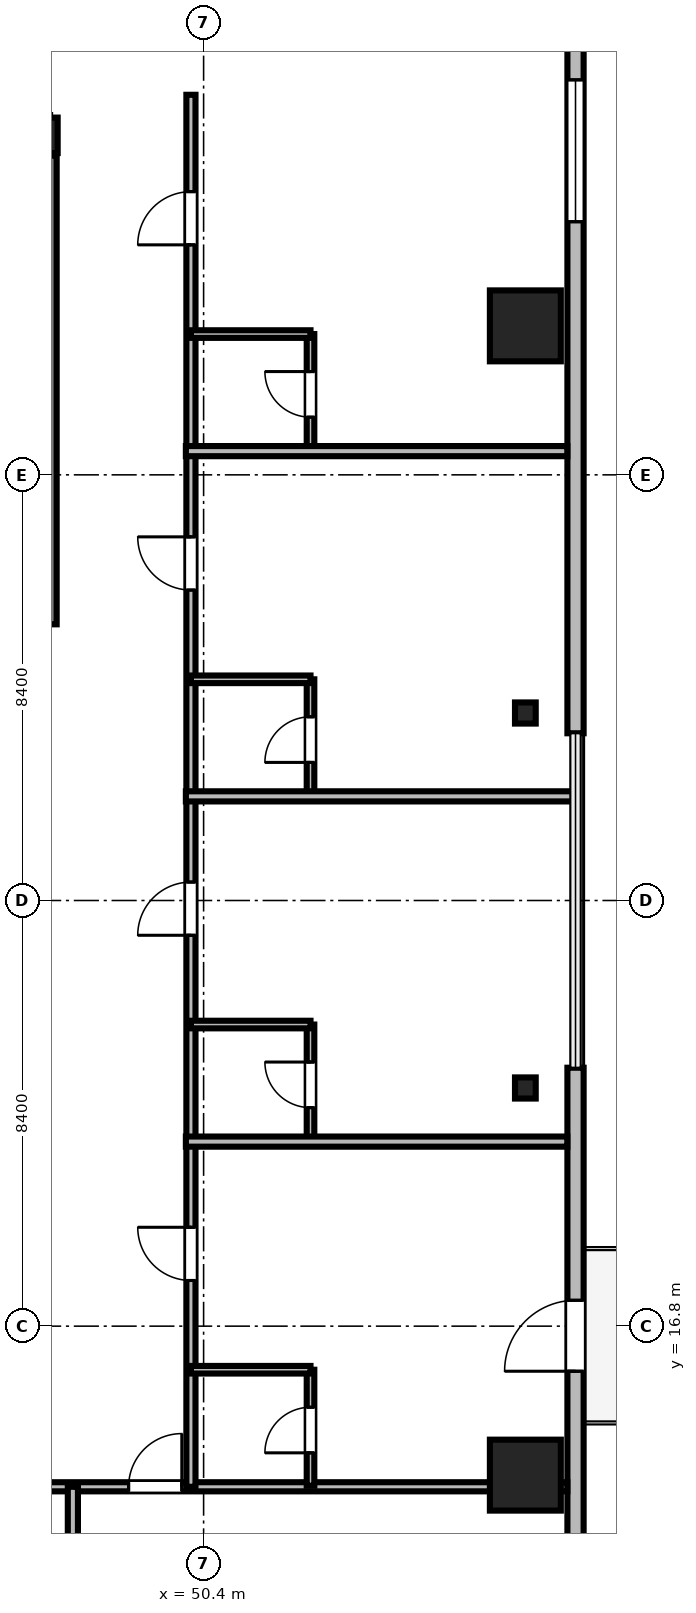
"""IFC4 building model, lengths in metres.
Left out: names, types, materials, properties, quantities, classifications, styles, units other than length and angle.
Written with IfcOpenShell. Run it as: python <this file> out.ifc"""

import sys

from ifc_helpers import new_model, si_unit, direction, frame, frame_2d, origin, origin_2d, place, context, subcontext, project, spatial, rectangle, i_section, extrude, source, transform, mapped, element, fill, save


model = new_model("IFC4")
c1 = context("Model", 3, precision=1e-05, world=origin(), true_north=direction((0.0, 1.0)))
c2 = subcontext(c1, "Body", "Model", "MODEL_VIEW")
j1 = project(units=[si_unit("LENGTHUNIT", "METRE"), si_unit("PLANEANGLEUNIT", "RADIAN")], contexts=[c1])
p1 = place(None, origin())
s1 = spatial("IfcSite", under=j1, at=p1, CompositionType="ELEMENT")
p2 = place(p1, origin())
s2 = spatial("IfcBuilding", under=s1, at=p2, CompositionType="ELEMENT")
p3 = place(p2, frame((0.0, 0.0, 196.05)))
s3 = spatial("IfcBuildingStorey", under=s2, at=p3, CompositionType="ELEMENT", Elevation=196.05)
m1 = source(origin(), c2, "Body", "SweptSolid", [
    extrude(i_section(OverallWidth=0.3, OverallDepth=0.7, WebThickness=0.017, FlangeThickness=0.032, FilletRadius=0.027, at=origin_2d()), origin(), (0.0, 0.0, 1.0), 3.53),
])
p4 = place(p3, frame((47.37, 40.3, 0.0), z_axis=(0.0, 0.0, 1.0), x_axis=(1.0, 0.0, 0.0)))
e1 = element("IfcColumn", 1, at=p4, inside=s3, PredefinedType="COLUMN", context=c2, shape_type="MappedRepresentation", body=[
    mapped(m1, transform((0.0, 0.0, 0.0), scale=1.0)),
])
m2 = source(origin(), c2, "Body", "SweptSolid", [
    extrude(rectangle(XDim=1.4, YDim=1.4, at=origin_2d()), origin(), (0.0, 0.0, 1.0), 3.53),
])
for number, where, z_axis, x_axis in (
    (2, (56.75, 13.86, 0.0), (0.0, 0.0, 1.0), (1.0, 0.0, 0.0)),
    (3, (56.75, 36.54, 0.0), (0.0, 0.0, 1.0), (1.0, 0.0, 0.0)),
):
    element("IfcColumn", number, at=place(p3, frame(where, z_axis=z_axis, x_axis=x_axis)), inside=s3, PredefinedType="COLUMN", context=c2, shape_type="MappedRepresentation", body=[
        mapped(m2, transform((0.0, 0.0, 0.0), scale=1.0)),
    ])
m3 = source(origin(), c2, "Body", "SweptSolid", [
    extrude(i_section(OverallWidth=0.409, OverallDepth=0.417, WebThickness=0.021, FlangeThickness=0.033, FilletRadius=0.015, at=origin_2d()), origin(), (0.0, 0.0, 1.0), 3.53),
])
for number, where, z_axis, x_axis in (
    (4, (56.75, 21.5, 0.0), (0.0, 0.0, 1.0), (1.0, 0.0, 0.0)),
    (5, (56.75, 28.9, 0.0), (0.0, 0.0, 1.0), (1.0, 0.0, 0.0)),
):
    element("IfcColumn", number, at=place(p3, frame(where, z_axis=z_axis, x_axis=x_axis)), inside=s3, PredefinedType="COLUMN", context=c2, shape_type="MappedRepresentation", body=[
        mapped(m3, transform((0.0, 0.0, 0.0), scale=1.0)),
    ])
m4 = source(origin(), c2, "Body", "SweptSolid", [
    extrude(rectangle(XDim=15.6, YDim=0.32, at=frame_2d((7.8, 0.0))), origin(), (0.0, 0.0, 1.0), 3.53),
])
p5 = place(p3, frame((57.74, 6.3, 0.0), z_axis=(0.0, 0.0, 1.0), x_axis=(0.0, 1.0, 0.0)))
e6 = element("IfcWall", 6, at=p5, inside=s3, PredefinedType="SOLIDWALL", context=c2, shape_type="MappedRepresentation", body=[
    mapped(m4, transform((0.0, 0.0, 0.0), scale=1.0)),
])
m5 = source(origin(), c2, "Body", "SweptSolid", [
    extrude(rectangle(XDim=1.4, YDim=2.3, at=frame_2d((0.7, 1.15))), frame((0.0, 0.17, 0.0), z_axis=(0.0, -1.0, 0.0), x_axis=(1.0, 0.0, 0.0)), (0.0, 0.0, 1.0), 0.34),
])
p6 = place(p5, frame((9.61, 0.0, 0.0)))
e7 = element("IfcOpeningElement", 7, at=p6, cuts=e6, PredefinedType="OPENING", context=c2, shape_type="MappedRepresentation", body=[
    mapped(m5, transform((0.0, 0.0, 0.0), scale=1.0)),
])
m6 = source(origin(), c2, "Body", "SweptSolid", [
    extrude(rectangle(XDim=2.8, YDim=2.4, at=frame_2d((1.4, 1.2))), frame((0.0, 0.17, 0.0), z_axis=(0.0, -1.0, 0.0), x_axis=(1.0, 0.0, 0.0)), (0.0, 0.0, 1.0), 0.34),
])
p7 = place(p5, frame((2.705, 0.0, 0.72)))
e8 = element("IfcOpeningElement", 8, at=p7, cuts=e6, PredefinedType="OPENING", context=c2, shape_type="MappedRepresentation", body=[
    mapped(m6, transform((0.0, 0.0, 0.0), scale=1.0)),
])
m7 = source(origin(), c2, "Body", "SweptSolid", [
    extrude(rectangle(XDim=15.6, YDim=0.32, at=frame_2d((7.8, 0.0))), origin(), (0.0, 0.0, 1.0), 3.53),
])
p8 = place(p3, frame((57.74, 28.5, 0.0), z_axis=(0.0, 0.0, 1.0), x_axis=(0.0, 1.0, 0.0)))
e9 = element("IfcWall", 9, at=p8, inside=s3, PredefinedType="SOLIDWALL", context=c2, shape_type="MappedRepresentation", body=[
    mapped(m7, transform((0.0, 0.0, 0.0), scale=1.0)),
])
p9 = place(p8, frame((10.095, 0.0, 0.72)))
e10 = element("IfcOpeningElement", 10, at=p9, cuts=e9, PredefinedType="OPENING", context=c2, shape_type="MappedRepresentation", body=[
    mapped(m6, transform((0.0, 0.0, 0.0), scale=1.0)),
])
m8 = source(origin(), c2, "Body", "SweptSolid", [
    extrude(rectangle(XDim=9.25, YDim=0.25, at=frame_2d((4.625, 0.0))), origin(), (0.0, 0.0, 1.0), 3.55),
])
p10 = place(p3, frame((47.375, 30.65, 0.0), z_axis=(0.0, 0.0, 1.0), x_axis=(0.0, 1.0, 0.0)))
e11 = element("IfcWall", 11, at=p10, inside=s3, PredefinedType="SOLIDWALL", context=c2, shape_type="MappedRepresentation", body=[
    mapped(m8, transform((0.0, 0.0, 0.0), scale=1.0)),
])
m9 = source(origin(), c2, "Body", "SweptSolid", [
    extrude(rectangle(XDim=46.156, YDim=0.18, at=frame_2d((23.078, 0.0))), origin(), (0.0, 0.0, 1.0), 2.772),
])
p11 = place(p3, frame((11.422, 13.63, 0.0), z_axis=(0.0, 0.0, 1.0), x_axis=(1.0, 0.0, 0.0)))
e12 = element("IfcWall", 12, at=p11, inside=s3, PredefinedType="PARTITIONING", context=c2, shape_type="MappedRepresentation", body=[
    mapped(m9, transform((0.0, 0.0, 0.0), scale=1.0)),
])
m10 = source(origin(), c2, "Body", "SweptSolid", [
    extrude(rectangle(XDim=1.05, YDim=2.2, at=frame_2d((0.525, 1.1))), frame((0.0, 0.1, 0.0), z_axis=(0.0, -1.0, 0.0), x_axis=(1.0, 0.0, 0.0)), (0.0, 0.0, 1.0), 0.2),
])
p12 = place(p11, frame((9.078, 0.0, 0.0)))
e13 = element("IfcOpeningElement", 13, at=p12, cuts=e12, PredefinedType="OPENING", context=c2, shape_type="MappedRepresentation", body=[
    mapped(m10, transform((0.0, 0.0, 0.0), scale=1.0)),
])
p13 = place(p11, frame((12.538, 0.0, 0.0)))
e14 = element("IfcOpeningElement", 14, at=p13, cuts=e12, PredefinedType="OPENING", context=c2, shape_type="MappedRepresentation", body=[
    mapped(m10, transform((0.0, 0.0, 0.0), scale=1.0)),
])
p14 = place(p11, frame((16.982, 0.0, 0.0)))
e15 = element("IfcOpeningElement", 15, at=p14, cuts=e12, PredefinedType="OPENING", context=c2, shape_type="MappedRepresentation", body=[
    mapped(m10, transform((0.0, 0.0, 0.0), scale=1.0)),
])
p15 = place(p11, frame((21.393, 0.0, 0.0)))
e16 = element("IfcOpeningElement", 16, at=p15, cuts=e12, PredefinedType="OPENING", context=c2, shape_type="MappedRepresentation", body=[
    mapped(m10, transform((0.0, 0.0, 0.0), scale=1.0)),
])
m11 = source(origin(), c2, "Body", "SweptSolid", [
    extrude(rectangle(XDim=0.95, YDim=2.15, at=frame_2d((0.475, 1.075))), frame((0.0, 0.1, 0.0), z_axis=(0.0, -1.0, 0.0), x_axis=(1.0, 0.0, 0.0)), (0.0, 0.0, 1.0), 0.2),
])
p16 = place(p11, frame((27.812, 0.0, 0.0)))
e17 = element("IfcOpeningElement", 17, at=p16, cuts=e12, PredefinedType="OPENING", context=c2, shape_type="MappedRepresentation", body=[
    mapped(m11, transform((0.0, 0.0, 0.0), scale=1.0)),
])
p17 = place(p11, frame((32.531, 0.0, 0.0)))
e18 = element("IfcOpeningElement", 18, at=p17, cuts=e12, PredefinedType="OPENING", context=c2, shape_type="MappedRepresentation", body=[
    mapped(m10, transform((0.0, 0.0, 0.0), scale=1.0)),
])
p18 = place(p11, frame((37.498, 0.0, 0.0)))
e19 = element("IfcOpeningElement", 19, at=p18, cuts=e12, PredefinedType="OPENING", context=c2, shape_type="MappedRepresentation", body=[
    mapped(m10, transform((0.0, 0.0, 0.0), scale=1.0)),
])
m12 = source(origin(), c2, "Body", "SweptSolid", [
    extrude(rectangle(XDim=27.47, YDim=0.18, at=frame_2d((13.735, 0.0))), origin(), (0.0, 0.0, 1.0), 2.972),
])
p19 = place(p3, frame((50.15, 13.63, 0.0), z_axis=(0.0, 0.0, 1.0), x_axis=(0.0, 1.0, 0.0)))
e20 = element("IfcWall", 20, at=p19, inside=s3, PredefinedType="PARTITIONING", context=c2, shape_type="MappedRepresentation", body=[
    mapped(m12, transform((0.0, 0.0, 0.0), scale=1.0)),
])
p20 = place(p19, frame((4.071, 0.0, 0.0)))
e21 = element("IfcOpeningElement", 21, at=p20, cuts=e20, PredefinedType="OPENING", context=c2, shape_type="MappedRepresentation", body=[
    mapped(m10, transform((0.0, 0.0, 0.0), scale=1.0)),
])
p21 = place(p19, frame((10.884, 0.0, 0.0)))
e22 = element("IfcOpeningElement", 22, at=p21, cuts=e20, PredefinedType="OPENING", context=c2, shape_type="MappedRepresentation", body=[
    mapped(m10, transform((0.0, 0.0, 0.0), scale=1.0)),
])
p22 = place(p19, frame((17.696, 0.0, 0.0)))
e23 = element("IfcOpeningElement", 23, at=p22, cuts=e20, PredefinedType="OPENING", context=c2, shape_type="MappedRepresentation", body=[
    mapped(m10, transform((0.0, 0.0, 0.0), scale=1.0)),
])
p23 = place(p19, frame((24.509, 0.0, 0.0)))
e24 = element("IfcOpeningElement", 24, at=p23, cuts=e20, PredefinedType="OPENING", context=c2, shape_type="MappedRepresentation", body=[
    mapped(m10, transform((0.0, 0.0, 0.0), scale=1.0)),
])
m13 = source(origin(), c2, "Body", "SweptSolid", [
    extrude(rectangle(XDim=2.29, YDim=0.15, at=frame_2d((1.145, 0.0))), origin(), (0.0, 0.0, 1.0), 2.972),
])
p24 = place(p3, frame((52.51, 13.65, 0.0), z_axis=(0.0, 0.0, 1.0), x_axis=(0.0, 1.0, 0.0)))
e25 = element("IfcWall", 25, at=p24, inside=s3, PredefinedType="PARTITIONING", context=c2, shape_type="MappedRepresentation", body=[
    mapped(m13, transform((0.0, 0.0, 0.0), scale=1.0)),
])
m14 = source(origin(), c2, "Body", "SweptSolid", [
    extrude(rectangle(XDim=0.9, YDim=2.1, at=frame_2d((0.45, 1.05))), frame((0.0, 0.085, 0.0), z_axis=(0.0, -1.0, 0.0), x_axis=(1.0, 0.0, 0.0)), (0.0, 0.0, 1.0), 0.17),
])
p25 = place(p24, frame((0.65, 0.0, 0.0)))
e26 = element("IfcOpeningElement", 26, at=p25, cuts=e25, PredefinedType="OPENING", context=c2, shape_type="MappedRepresentation", body=[
    mapped(m14, transform((0.0, 0.0, 0.0), scale=1.0)),
])
m15 = source(origin(), c2, "Body", "SweptSolid", [
    extrude(rectangle(XDim=2.29, YDim=0.15, at=frame_2d((1.145, 0.0))), origin(), (0.0, 0.0, 1.0), 3.53),
])
p26 = place(p3, frame((52.51, 20.462, 0.0), z_axis=(0.0, 0.0, 1.0), x_axis=(0.0, 1.0, 0.0)))
e27 = element("IfcWall", 27, at=p26, inside=s3, PredefinedType="PARTITIONING", context=c2, shape_type="MappedRepresentation", body=[
    mapped(m15, transform((0.0, 0.0, 0.0), scale=1.0)),
])
p27 = place(p26, frame((0.65, 0.0, 0.0)))
e28 = element("IfcOpeningElement", 28, at=p27, cuts=e27, PredefinedType="OPENING", context=c2, shape_type="MappedRepresentation", body=[
    mapped(m14, transform((0.0, 0.0, 0.0), scale=1.0)),
])
p28 = place(p3, frame((52.51, 27.275, 0.0), z_axis=(0.0, 0.0, 1.0), x_axis=(0.0, 1.0, 0.0)))
e29 = element("IfcWall", 29, at=p28, inside=s3, PredefinedType="PARTITIONING", context=c2, shape_type="MappedRepresentation", body=[
    mapped(m13, transform((0.0, 0.0, 0.0), scale=1.0)),
])
p29 = place(p28, frame((0.65, 0.0, 0.0)))
e30 = element("IfcOpeningElement", 30, at=p29, cuts=e29, PredefinedType="OPENING", context=c2, shape_type="MappedRepresentation", body=[
    mapped(m14, transform((0.0, 0.0, 0.0), scale=1.0)),
])
p30 = place(p3, frame((52.51, 34.088, 0.0), z_axis=(0.0, 0.0, 1.0), x_axis=(0.0, 1.0, 0.0)))
e31 = element("IfcWall", 31, at=p30, inside=s3, PredefinedType="PARTITIONING", context=c2, shape_type="MappedRepresentation", body=[
    mapped(m15, transform((0.0, 0.0, 0.0), scale=1.0)),
])
p31 = place(p30, frame((0.65, 0.0, 0.0)))
e32 = element("IfcOpeningElement", 32, at=p31, cuts=e31, PredefinedType="OPENING", context=c2, shape_type="MappedRepresentation", body=[
    mapped(m14, transform((0.0, 0.0, 0.0), scale=1.0)),
])
m16 = source(origin(), c2, "Body", "SweptSolid", [
    extrude(rectangle(XDim=11.508, YDim=0.2, at=frame_2d((5.754, 0.0))), origin(), (0.0, 0.0, 1.0), 2.772),
])
p32 = place(p3, frame((47.82, 2.122, 0.0), z_axis=(0.0, 0.0, 1.0), x_axis=(0.0, 1.0, 0.0)))
e33 = element("IfcWall", 33, at=p32, inside=s3, PredefinedType="PARTITIONING", context=c2, shape_type="MappedRepresentation", body=[
    mapped(m16, transform((0.0, 0.0, 0.0), scale=1.0)),
])
m17 = source(origin(), c2, "Body", "SweptSolid", [
    extrude(rectangle(XDim=7.528, YDim=0.2, at=frame_2d((3.764, 0.0))), origin(), (0.0, 0.0, 1.0), 2.772),
])
p33 = place(p3, frame((50.05, 20.442, 0.0), z_axis=(0.0, 0.0, 1.0), x_axis=(1.0, 0.0, 0.0)))
e34 = element("IfcWall", 34, at=p33, inside=s3, PredefinedType="PARTITIONING", context=c2, shape_type="MappedRepresentation", body=[
    mapped(m17, transform((0.0, 0.0, 0.0), scale=1.0)),
])
m18 = source(origin(), c2, "Body", "SweptSolid", [
    extrude(rectangle(XDim=7.72, YDim=0.2, at=frame_2d((3.86, 0.0))), origin(), (0.0, 0.0, 1.0), 2.772),
])
p34 = place(p3, frame((50.05, 27.255, 0.0), z_axis=(0.0, 0.0, 1.0), x_axis=(1.0, 0.0, 0.0)))
e35 = element("IfcWall", 35, at=p34, inside=s3, PredefinedType="PARTITIONING", context=c2, shape_type="MappedRepresentation", body=[
    mapped(m18, transform((0.0, 0.0, 0.0), scale=1.0)),
])
p35 = place(p3, frame((50.05, 34.068, 0.0), z_axis=(0.0, 0.0, 1.0), x_axis=(1.0, 0.0, 0.0)))
e36 = element("IfcWall", 36, at=p35, inside=s3, PredefinedType="PARTITIONING", context=c2, shape_type="MappedRepresentation", body=[
    mapped(m17, transform((0.0, 0.0, 0.0), scale=1.0)),
])
m19 = source(origin(), c2, "Body", "SweptSolid", [
    extrude(rectangle(XDim=2.36, YDim=0.15, at=frame_2d((1.18, 0.0))), origin(), (0.0, 0.0, 1.0), 3.53),
])
for number, where, z_axis, x_axis in (
    (37, (50.15, 15.94, 0.0), (0.0, 0.0, 1.0), (1.0, 0.0, 0.0)),
    (38, (50.15, 22.752, 0.0), (0.0, 0.0, 1.0), (1.0, 0.0, 0.0)),
    (39, (50.15, 29.565, 0.0), (0.0, 0.0, 1.0), (1.0, 0.0, 0.0)),
    (40, (50.15, 36.378, 0.0), (0.0, 0.0, 1.0), (1.0, 0.0, 0.0)),
):
    element("IfcWall", number, at=place(p3, frame(where, z_axis=z_axis, x_axis=x_axis)), inside=s3, PredefinedType="PARTITIONING", context=c2, shape_type="MappedRepresentation", body=[
        mapped(m19, transform((0.0, 0.0, 0.0), scale=1.0)),
    ])
m20 = source(origin(), c2, "Body", "SweptSolid", [
    extrude(rectangle(XDim=1.4, YDim=2.3, at=frame_2d((0.7, 1.15))), frame((0.0, 0.025, 0.0), z_axis=(0.0, -1.0, 0.0), x_axis=(1.0, 0.0, 0.0)), (0.0, 0.0, 1.0), 0.05),
])
p36 = place(p6, frame((1.4, 0.0, 0.0), z_axis=(0.0, 0.0, 1.0), x_axis=(-1.0, 0.0, 0.0)))
e41 = element("IfcDoor", 41, at=p36, inside=s3, OperationType="DOUBLE_DOOR_SLIDING", PredefinedType="DOOR", context=c2, shape_type="MappedRepresentation", body=[
    mapped(m20, transform((0.0, 0.0, 0.0), scale=1.0)),
])
fill(e7, e41)
m21 = source(origin(), c2, "Body", "SweptSolid", [
    extrude(rectangle(XDim=2.8, YDim=2.4, at=frame_2d((1.4, 1.2))), frame((0.0, 0.03, 0.0), z_axis=(0.0, -1.0, 0.0), x_axis=(1.0, 0.0, 0.0)), (0.0, 0.0, 1.0), 0.06),
])
p37 = place(p9, origin())
e42 = element("IfcWindow", 42, at=p37, inside=s3, PartitioningType="SINGLE_PANEL", PredefinedType="WINDOW", context=c2, shape_type="MappedRepresentation", body=[
    mapped(m21, transform((0.0, 0.0, 0.0), scale=1.0)),
])
fill(e10, e42)
m22 = source(origin(), c2, "Body", "SweptSolid", [
    extrude(rectangle(XDim=1.05, YDim=2.2, at=frame_2d((0.525, 1.1))), frame((0.0, 0.025, 0.0), z_axis=(0.0, -1.0, 0.0), x_axis=(1.0, 0.0, 0.0)), (0.0, 0.0, 1.0), 0.05),
])
p38 = place(p18, origin())
e43 = element("IfcDoor", 43, at=p38, inside=s3, OperationType="SINGLE_SWING_RIGHT", PredefinedType="DOOR", context=c2, shape_type="MappedRepresentation", body=[
    mapped(m22, transform((0.0, 0.0, 0.0), scale=1.0)),
])
fill(e19, e43)
p39 = place(p20, origin())
e44 = element("IfcDoor", 44, at=p39, inside=s3, OperationType="SINGLE_SWING_RIGHT", PredefinedType="DOOR", context=c2, shape_type="MappedRepresentation", body=[
    mapped(m22, transform((0.0, 0.0, 0.0), scale=1.0)),
])
fill(e21, e44)
p40 = place(p21, origin())
e45 = element("IfcDoor", 45, at=p40, inside=s3, OperationType="SINGLE_SWING_LEFT", PredefinedType="DOOR", context=c2, shape_type="MappedRepresentation", body=[
    mapped(m22, transform((0.0, 0.0, 0.0), scale=1.0)),
])
fill(e22, e45)
p41 = place(p22, origin())
e46 = element("IfcDoor", 46, at=p41, inside=s3, OperationType="SINGLE_SWING_RIGHT", PredefinedType="DOOR", context=c2, shape_type="MappedRepresentation", body=[
    mapped(m22, transform((0.0, 0.0, 0.0), scale=1.0)),
])
fill(e23, e46)
p42 = place(p23, origin())
e47 = element("IfcDoor", 47, at=p42, inside=s3, OperationType="SINGLE_SWING_LEFT", PredefinedType="DOOR", context=c2, shape_type="MappedRepresentation", body=[
    mapped(m22, transform((0.0, 0.0, 0.0), scale=1.0)),
])
fill(e24, e47)
m23 = source(origin(), c2, "Body", "SweptSolid", [
    extrude(rectangle(XDim=0.9, YDim=2.1, at=frame_2d((0.45, 1.05))), frame((0.0, 0.025, 0.0), z_axis=(0.0, -1.0, 0.0), x_axis=(1.0, 0.0, 0.0)), (0.0, 0.0, 1.0), 0.05),
])
p43 = place(p25, origin())
e48 = element("IfcDoor", 48, at=p43, inside=s3, OperationType="SINGLE_SWING_LEFT", PredefinedType="DOOR", context=c2, shape_type="MappedRepresentation", body=[
    mapped(m23, transform((0.0, 0.0, 0.0), scale=1.0)),
])
fill(e26, e48)
p44 = place(p27, origin())
e49 = element("IfcDoor", 49, at=p44, inside=s3, OperationType="SINGLE_SWING_RIGHT", PredefinedType="DOOR", context=c2, shape_type="MappedRepresentation", body=[
    mapped(m23, transform((0.0, 0.0, 0.0), scale=1.0)),
])
fill(e28, e49)
p45 = place(p29, origin())
e50 = element("IfcDoor", 50, at=p45, inside=s3, OperationType="SINGLE_SWING_LEFT", PredefinedType="DOOR", context=c2, shape_type="MappedRepresentation", body=[
    mapped(m23, transform((0.0, 0.0, 0.0), scale=1.0)),
])
fill(e30, e50)
p46 = place(p31, origin())
e51 = element("IfcDoor", 51, at=p46, inside=s3, OperationType="SINGLE_SWING_RIGHT", PredefinedType="DOOR", context=c2, shape_type="MappedRepresentation", body=[
    mapped(m23, transform((0.0, 0.0, 0.0), scale=1.0)),
])
fill(e32, e51)
save(model, sys.argv[1])
